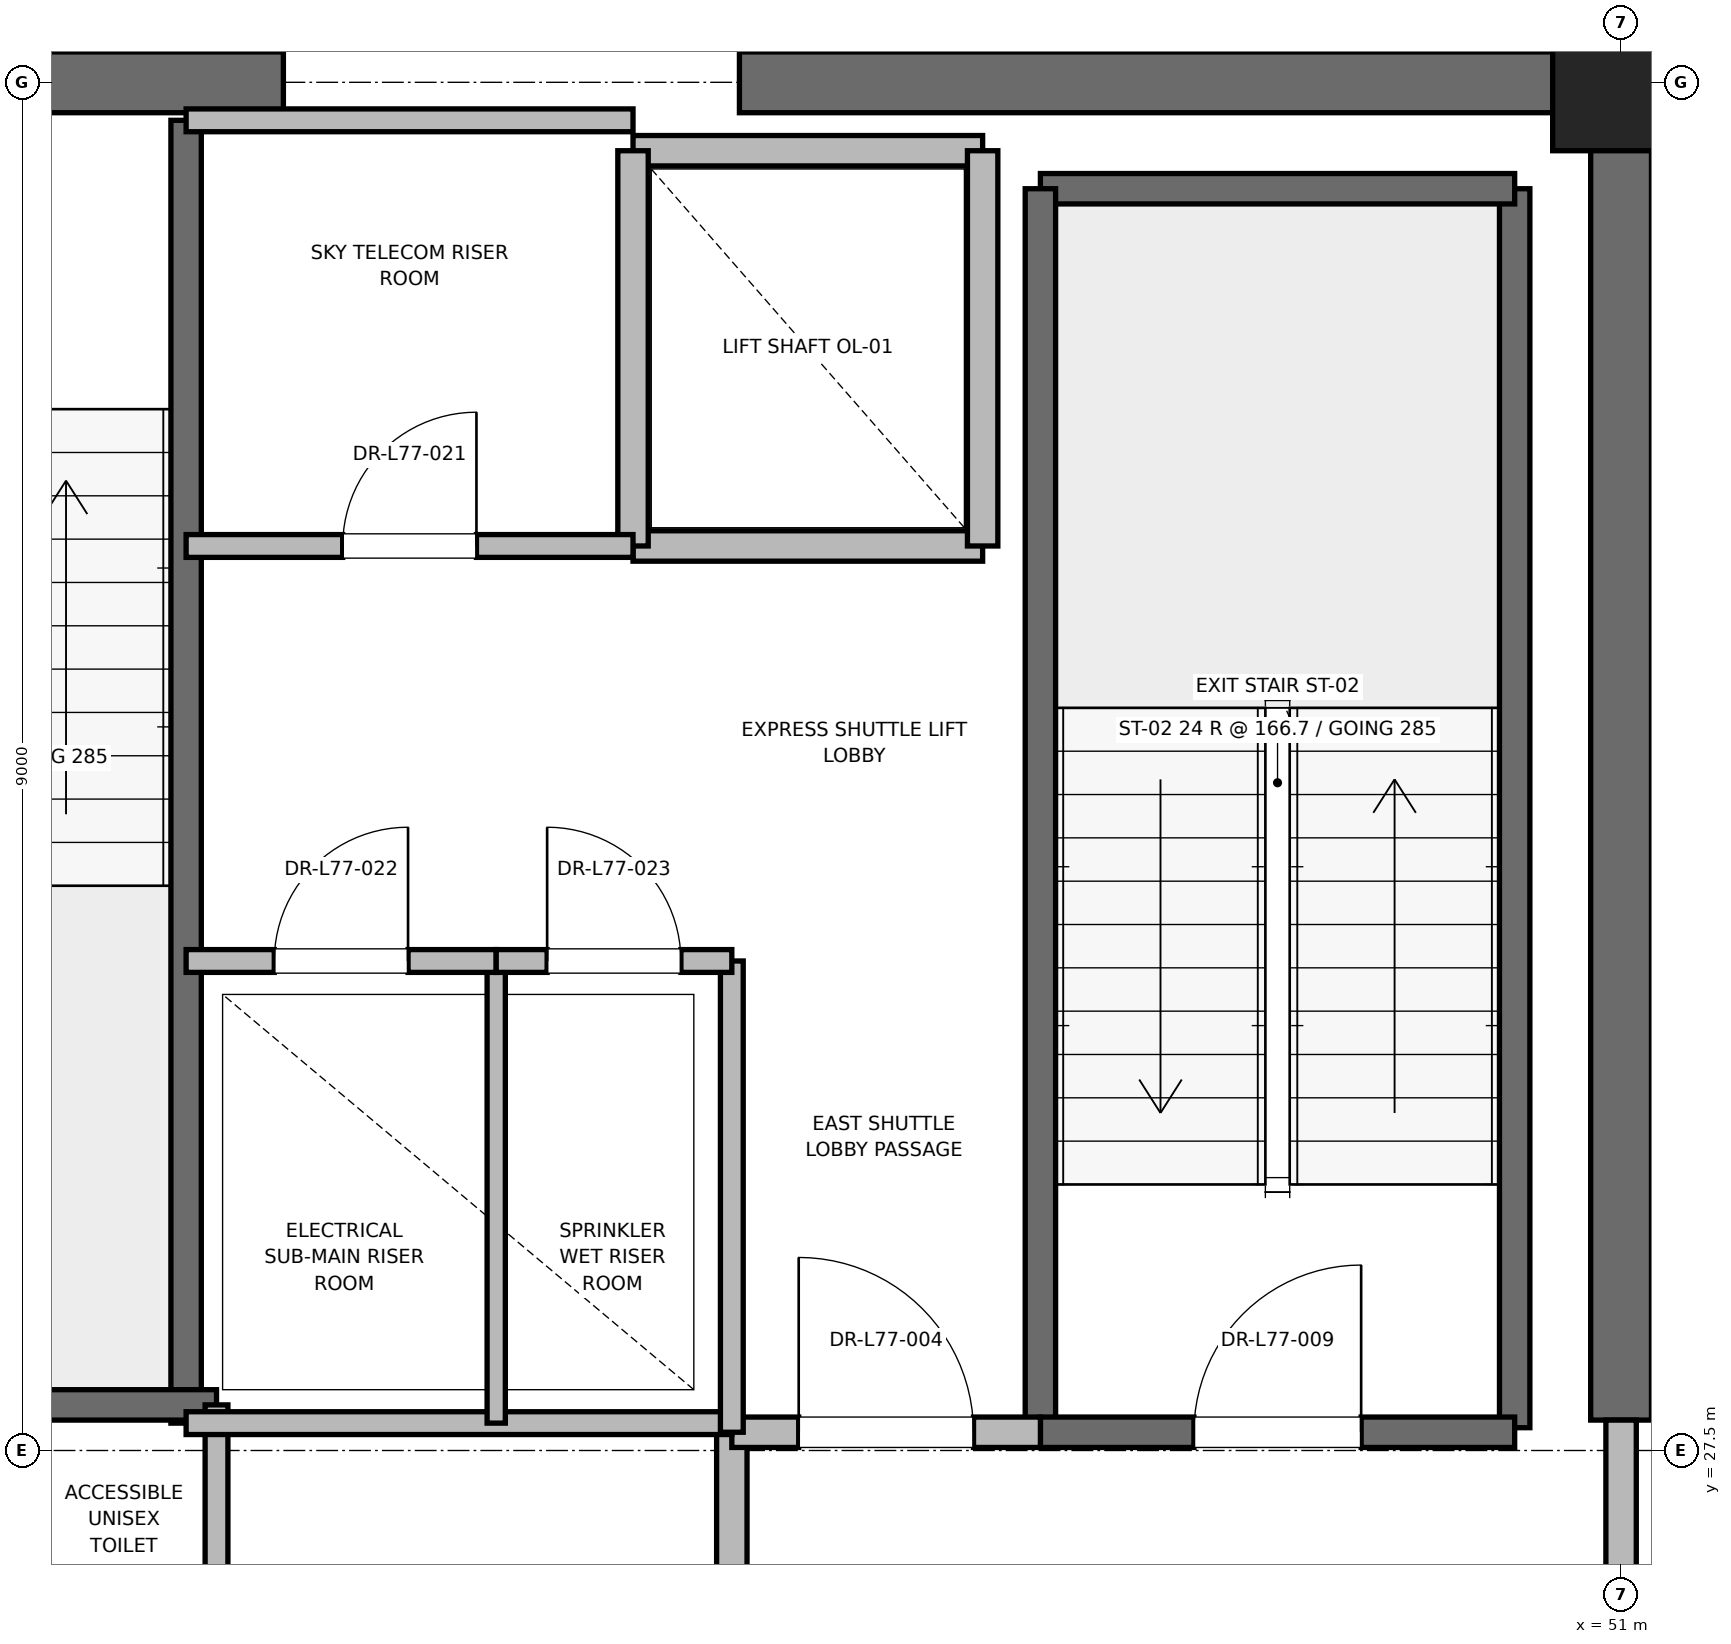
"""IFC4 building model, lengths in metres.
Left out: names, types, materials, properties, quantities, classifications, styles, units other than length and angle.
Written with IfcOpenShell. Run it as: python <this file> out.ifc"""

import sys

from ifc_helpers import new_model, si_unit, direction, frame, frame_2d, origin, origin_2d, place, context, subcontext, project, spatial, rectangle, extrude, element, fill, save


model = new_model("IFC4")
c1 = context("Model", 3, precision=1e-05, world=origin(), true_north=direction((0.0, 1.0)))
c2 = subcontext(c1, "Body", "Model", "MODEL_VIEW")
j1 = project(units=[si_unit("LENGTHUNIT", "METRE"), si_unit("PLANEANGLEUNIT", "RADIAN")], contexts=[c1])
p1 = place(None, origin())
s1 = spatial("IfcSite", under=j1, at=p1, CompositionType="ELEMENT")
p2 = place(p1, origin())
s2 = spatial("IfcBuilding", under=s1, at=p2, CompositionType="ELEMENT")
p3 = place(p2, frame((0.0, 0.0, 330.8)))
s3 = spatial("IfcBuildingStorey", under=s2, at=p3, CompositionType="ELEMENT", Elevation=330.8)
p4 = place(p3, frame((51.0, 36.5, 0.0), z_axis=(0.0, 0.0, 1.0), x_axis=(1.0, 0.0, 0.0)))
e1 = element("IfcColumn", 1, at=p4, inside=s3, PredefinedType="PILASTER", context=c2, shape_type="SweptSolid", body=[
    extrude(rectangle(XDim=0.9, YDim=0.9, at=origin_2d()), origin(), (0.0, 0.0, 1.0), 4.0),
])
p5 = place(p3, frame((37.8, 36.5, 0.0), z_axis=(0.0, 0.0, 1.0), x_axis=(1.0, 0.0, 0.0)))
e2 = element("IfcWall", 2, at=p5, inside=s3, PredefinedType="SHEAR", context=c2, shape_type="SweptSolid", body=[
    extrude(rectangle(XDim=4.4, YDim=0.4, at=frame_2d((2.2, 0.0))), origin(), (0.0, 0.0, 1.0), 3.785),
])
p6 = place(p5, frame((1.65, 0.0, 0.0)))
e3 = element("IfcOpeningElement", 3, at=p6, cuts=e2, PredefinedType="OPENING", context=c2, shape_type="SweptSolid", body=[
    extrude(rectangle(XDim=1.1, YDim=2.15, at=frame_2d((0.55, 1.075))), frame((0.0, 0.2, 0.0), z_axis=(0.0, -1.0, 0.0), x_axis=(1.0, 0.0, 0.0)), (0.0, 0.0, 1.0), 0.4),
])
p7 = place(p3, frame((45.2, 36.5, 0.0), z_axis=(0.0, 0.0, 1.0), x_axis=(1.0, 0.0, 0.0)))
e4 = element("IfcWall", 4, at=p7, inside=s3, PredefinedType="SHEAR", context=c2, shape_type="SweptSolid", body=[
    extrude(rectangle(XDim=5.8, YDim=0.4, at=frame_2d((2.9, 0.0))), origin(), (0.0, 0.0, 1.0), 3.785),
])
p8 = place(p3, frame((51.0, 27.7, 0.0), z_axis=(0.0, 0.0, 1.0), x_axis=(0.0, 1.0, 0.0)))
e5 = element("IfcWall", 5, at=p8, inside=s3, PredefinedType="SHEAR", context=c2, shape_type="SweptSolid", body=[
    extrude(rectangle(XDim=8.8, YDim=0.4, at=frame_2d((4.4, 0.0))), origin(), (0.0, 0.0, 1.0), 3.785),
])
p9 = place(p3, frame((50.3, 27.65, 0.0), z_axis=(0.0, 0.0, 1.0), x_axis=(0.0, 1.0, 0.0)))
e6 = element("IfcWall", 6, at=p9, inside=s3, PredefinedType="SOLIDWALL", context=c2, shape_type="SweptSolid", body=[
    extrude(rectangle(XDim=8.15, YDim=0.2, at=frame_2d((4.075, 0.0))), origin(), (0.0, 0.0, 1.0), 3.785),
])
p10 = place(p3, frame((47.18, 35.8, 0.0), z_axis=(0.0, 0.0, 1.0), x_axis=(1.0, 0.0, 0.0)))
e7 = element("IfcWall", 7, at=p10, inside=s3, PredefinedType="SOLIDWALL", context=c2, shape_type="SweptSolid", body=[
    extrude(rectangle(XDim=3.12, YDim=0.2, at=frame_2d((1.56, 0.0))), origin(), (0.0, 0.0, 1.0), 3.785),
])
p11 = place(p3, frame((47.18, 27.62, 0.0), z_axis=(0.0, 0.0, 1.0), x_axis=(0.0, 1.0, 0.0)))
e8 = element("IfcWall", 8, at=p11, inside=s3, PredefinedType="SOLIDWALL", context=c2, shape_type="SweptSolid", body=[
    extrude(rectangle(XDim=8.18, YDim=0.2, at=frame_2d((4.09, 0.0))), origin(), (0.0, 0.0, 1.0), 3.785),
])
p12 = place(p3, frame((47.18, 27.62, 0.0), z_axis=(0.0, 0.0, 1.0), x_axis=(1.0, 0.0, 0.0)))
e9 = element("IfcWall", 9, at=p12, inside=s3, PredefinedType="SOLIDWALL", context=c2, shape_type="SweptSolid", body=[
    extrude(rectangle(XDim=3.12, YDim=0.2, at=frame_2d((1.56, 0.0))), origin(), (0.0, 0.0, 1.0), 3.785),
])
p13 = place(p12, frame((1.01, 0.0, 0.0)))
e10 = element("IfcOpeningElement", 10, at=p13, cuts=e9, PredefinedType="OPENING", context=c2, shape_type="SweptSolid", body=[
    extrude(rectangle(XDim=1.1, YDim=2.15, at=frame_2d((0.55, 1.075))), frame((0.0, 0.1, 0.0), z_axis=(0.0, -1.0, 0.0), x_axis=(1.0, 0.0, 0.0)), (0.0, 0.0, 1.0), 0.2),
])
p14 = place(p3, frame((41.56, 27.68, 0.0), z_axis=(0.0, 0.0, 1.0), x_axis=(0.0, 1.0, 0.0)))
e11 = element("IfcWall", 11, at=p14, inside=s3, PredefinedType="SOLIDWALL", context=c2, shape_type="SweptSolid", body=[
    extrude(rectangle(XDim=8.57, YDim=0.2, at=frame_2d((4.285, 0.0))), origin(), (0.0, 0.0, 1.0), 3.785),
])
p15 = place(p3, frame((38.44, 27.8, 0.0), z_axis=(0.0, 0.0, 1.0), x_axis=(1.0, 0.0, 0.0)))
e12 = element("IfcWall", 12, at=p15, inside=s3, PredefinedType="SOLIDWALL", context=c2, shape_type="SweptSolid", body=[
    extrude(rectangle(XDim=3.32, YDim=0.2, at=frame_2d((1.66, 0.0))), origin(), (0.0, 0.0, 1.0), 3.785),
])
p16 = place(p3, frame((45.15, 24.25, 0.0), z_axis=(0.0, 0.0, 1.0), x_axis=(0.0, 1.0, 0.0)))
e13 = element("IfcWall", 13, at=p16, inside=s3, PredefinedType="PARTITIONING", context=c2, shape_type="SweptSolid", body=[
    extrude(rectangle(XDim=3.37, YDim=0.2, at=frame_2d((1.685, 0.0))), origin(), (0.0, 0.0, 1.0), 3.785),
])
p17 = place(p3, frame((45.15, 27.62, 0.0), z_axis=(0.0, 0.0, 1.0), x_axis=(1.0, 0.0, 0.0)))
e14 = element("IfcWall", 14, at=p17, inside=s3, PredefinedType="PARTITIONING", context=c2, shape_type="SweptSolid", body=[
    extrude(rectangle(XDim=2.03, YDim=0.2, at=frame_2d((1.015, 0.0))), origin(), (0.0, 0.0, 1.0), 3.785),
])
p18 = place(p17, frame((0.44, 0.0, 0.0)))
e15 = element("IfcOpeningElement", 15, at=p18, cuts=e14, PredefinedType="OPENING", context=c2, shape_type="SweptSolid", body=[
    extrude(rectangle(XDim=1.15, YDim=2.2, at=frame_2d((0.575, 1.1))), frame((0.0, 0.1, 0.0), z_axis=(0.0, -1.0, 0.0), x_axis=(1.0, 0.0, 0.0)), (0.0, 0.0, 1.0), 0.2),
])
p19 = place(p3, frame((51.0, 24.3, 0.0), z_axis=(0.0, 0.0, 1.0), x_axis=(0.0, 1.0, 0.0)))
e16 = element("IfcWall", 16, at=p19, inside=s3, PredefinedType="PARTITIONING", context=c2, shape_type="SweptSolid", body=[
    extrude(rectangle(XDim=3.4, YDim=0.2, at=frame_2d((1.7, 0.0))), origin(), (0.0, 0.0, 1.0), 2.865),
])
p20 = place(p19, frame((1.125, 0.0, 0.0)))
e17 = element("IfcOpeningElement", 17, at=p20, cuts=e16, PredefinedType="OPENING", context=c2, shape_type="SweptSolid", body=[
    extrude(rectangle(XDim=1.15, YDim=2.2, at=frame_2d((0.575, 1.1))), frame((0.0, 0.1, 0.0), z_axis=(0.0, -1.0, 0.0), x_axis=(1.0, 0.0, 0.0)), (0.0, 0.0, 1.0), 0.2),
])
p21 = place(p3, frame((44.5, 33.45, 0.0), z_axis=(0.0, 0.0, 1.0), x_axis=(1.0, 0.0, 0.0)))
e18 = element("IfcWall", 18, at=p21, inside=s3, PredefinedType="SOLIDWALL", context=c2, shape_type="SweptSolid", body=[
    extrude(rectangle(XDim=2.3, YDim=0.2, at=frame_2d((1.15, 0.0))), origin(), (0.0, 0.0, 1.0), 3.785),
])
p22 = place(p3, frame((46.8, 36.05, 0.0), z_axis=(0.0, 0.0, 1.0), x_axis=(-1.0, 0.0, 0.0)))
e19 = element("IfcWall", 19, at=p22, inside=s3, PredefinedType="SOLIDWALL", context=c2, shape_type="SweptSolid", body=[
    extrude(rectangle(XDim=2.3, YDim=0.2, at=frame_2d((1.15, 0.0))), origin(), (0.0, 0.0, 1.0), 2.865),
])
p23 = place(p3, frame((44.5, 36.05, 0.0), z_axis=(0.0, 0.0, 1.0), x_axis=(0.0, -1.0, 0.0)))
e20 = element("IfcWall", 20, at=p23, inside=s3, PredefinedType="SOLIDWALL", context=c2, shape_type="SweptSolid", body=[
    extrude(rectangle(XDim=2.6, YDim=0.2, at=frame_2d((1.3, 0.0))), origin(), (0.0, 0.0, 1.0), 2.865),
])
p24 = place(p3, frame((46.8, 33.45, 0.0), z_axis=(0.0, 0.0, 1.0), x_axis=(0.0, 1.0, 0.0)))
e21 = element("IfcWall", 21, at=p24, inside=s3, PredefinedType="SOLIDWALL", context=c2, shape_type="SweptSolid", body=[
    extrude(rectangle(XDim=2.6, YDim=0.2, at=frame_2d((1.3, 0.0))), origin(), (0.0, 0.0, 1.0), 3.785),
])
p25 = place(p3, frame((41.76, 23.8, 0.0), z_axis=(0.0, 0.0, 1.0), x_axis=(0.0, 1.0, 0.0)))
e22 = element("IfcWall", 22, at=p25, inside=s3, PredefinedType="PARTITIONING", context=c2, shape_type="SweptSolid", body=[
    extrude(rectangle(XDim=4.0, YDim=0.15, at=frame_2d((2.0, 0.0))), origin(), (0.0, 0.0, 1.0), 2.85),
])
p26 = place(p3, frame((41.56, 27.68, 0.0), z_axis=(0.0, 0.0, 1.0), x_axis=(1.0, 0.0, 0.0)))
e23 = element("IfcWall", 23, at=p26, inside=s3, PredefinedType="PARTITIONING", context=c2, shape_type="SweptSolid", body=[
    extrude(rectangle(XDim=3.59, YDim=0.15, at=frame_2d((1.795, 0.0))), origin(), (0.0, 0.0, 1.0), 2.85),
])
p27 = place(p3, frame((45.15, 27.62, 0.0), z_axis=(0.0, 0.0, 1.0), x_axis=(0.0, 1.0, 0.0)))
e24 = element("IfcWall", 24, at=p27, inside=s3, PredefinedType="PARTITIONING", context=c2, shape_type="SweptSolid", body=[
    extrude(rectangle(XDim=3.1, YDim=0.15, at=frame_2d((1.55, 0.0))), origin(), (0.0, 0.0, 1.0), 2.85),
])
p28 = place(p3, frame((43.6, 27.68, 0.0), z_axis=(0.0, 0.0, 1.0), x_axis=(0.0, 1.0, 0.0)))
e25 = element("IfcWall", 25, at=p28, inside=s3, PredefinedType="PARTITIONING", context=c2, shape_type="SweptSolid", body=[
    extrude(rectangle(XDim=3.04, YDim=0.12, at=frame_2d((1.52, 0.0))), origin(), (0.0, 0.0, 1.0), 2.85),
])
p29 = place(p3, frame((41.56, 30.72, 0.0), z_axis=(0.0, 0.0, 1.0), x_axis=(1.0, 0.0, 0.0)))
e26 = element("IfcWall", 26, at=p29, inside=s3, PredefinedType="PARTITIONING", context=c2, shape_type="SweptSolid", body=[
    extrude(rectangle(XDim=2.04, YDim=0.15, at=frame_2d((1.02, 0.0))), origin(), (0.0, 0.0, 1.0), 2.85),
])
p30 = place(p29, frame((0.58, 0.0, 0.0)))
e27 = element("IfcOpeningElement", 27, at=p30, cuts=e26, PredefinedType="OPENING", context=c2, shape_type="SweptSolid", body=[
    extrude(rectangle(XDim=0.88, YDim=2.1, at=frame_2d((0.44, 1.05))), frame((0.0, 0.075, 0.0), z_axis=(0.0, -1.0, 0.0), x_axis=(1.0, 0.0, 0.0)), (0.0, 0.0, 1.0), 0.15),
])
p31 = place(p3, frame((43.6, 30.72, 0.0), z_axis=(0.0, 0.0, 1.0), x_axis=(1.0, 0.0, 0.0)))
e28 = element("IfcWall", 28, at=p31, inside=s3, PredefinedType="PARTITIONING", context=c2, shape_type="SweptSolid", body=[
    extrude(rectangle(XDim=1.55, YDim=0.15, at=frame_2d((0.775, 0.0))), origin(), (0.0, 0.0, 1.0), 2.85),
])
p32 = place(p31, frame((0.335, 0.0, 0.0)))
e29 = element("IfcOpeningElement", 29, at=p32, cuts=e28, PredefinedType="OPENING", context=c2, shape_type="SweptSolid", body=[
    extrude(rectangle(XDim=0.88, YDim=2.1, at=frame_2d((0.44, 1.05))), frame((0.0, 0.075, 0.0), z_axis=(0.0, -1.0, 0.0), x_axis=(1.0, 0.0, 0.0)), (0.0, 0.0, 1.0), 0.15),
])
p33 = place(p3, frame((41.56, 36.25, 0.0), z_axis=(0.0, 0.0, 1.0), x_axis=(1.0, 0.0, 0.0)))
e30 = element("IfcWall", 30, at=p33, inside=s3, PredefinedType="PARTITIONING", context=c2, shape_type="SweptSolid", body=[
    extrude(rectangle(XDim=2.94, YDim=0.15, at=frame_2d((1.47, 0.0))), origin(), (0.0, 0.0, 1.0), 2.85),
])
p34 = place(p3, frame((41.56, 33.45, 0.0), z_axis=(0.0, 0.0, 1.0), x_axis=(1.0, 0.0, 0.0)))
e31 = element("IfcWall", 31, at=p34, inside=s3, PredefinedType="PARTITIONING", context=c2, shape_type="SweptSolid", body=[
    extrude(rectangle(XDim=2.94, YDim=0.15, at=frame_2d((1.47, 0.0))), origin(), (0.0, 0.0, 1.0), 2.85),
])
p35 = place(p34, frame((1.03, 0.0, 0.0)))
e32 = element("IfcOpeningElement", 32, at=p35, cuts=e31, PredefinedType="OPENING", context=c2, shape_type="SweptSolid", body=[
    extrude(rectangle(XDim=0.88, YDim=2.1, at=frame_2d((0.44, 1.05))), frame((0.0, 0.075, 0.0), z_axis=(0.0, -1.0, 0.0), x_axis=(1.0, 0.0, 0.0)), (0.0, 0.0, 1.0), 0.15),
])
p36 = place(p13, origin())
e33 = element("IfcDoor", 33, at=p36, inside=s3, OperationType="SINGLE_SWING_RIGHT", PredefinedType="DOOR", context=c2, shape_type="SweptSolid", body=[
    extrude(rectangle(XDim=1.1, YDim=2.15, at=frame_2d((0.55, 1.075))), frame((0.0, 0.025, 0.0), z_axis=(0.0, -1.0, 0.0), x_axis=(1.0, 0.0, 0.0)), (0.0, 0.0, 1.0), 0.05),
])
fill(e10, e33)
p37 = place(p18, origin())
e34 = element("IfcDoor", 34, at=p37, inside=s3, OperationType="SINGLE_SWING_LEFT", PredefinedType="DOOR", context=c2, shape_type="SweptSolid", body=[
    extrude(rectangle(XDim=1.15, YDim=2.2, at=frame_2d((0.575, 1.1))), frame((0.0, 0.025, 0.0), z_axis=(0.0, -1.0, 0.0), x_axis=(1.0, 0.0, 0.0)), (0.0, 0.0, 1.0), 0.05),
])
fill(e15, e34)
p38 = place(p30, origin())
e35 = element("IfcDoor", 35, at=p38, inside=s3, OperationType="SINGLE_SWING_RIGHT", PredefinedType="DOOR", context=c2, shape_type="SweptSolid", body=[
    extrude(rectangle(XDim=0.88, YDim=2.1, at=frame_2d((0.44, 1.05))), frame((0.0, 0.025, 0.0), z_axis=(0.0, -1.0, 0.0), x_axis=(1.0, 0.0, 0.0)), (0.0, 0.0, 1.0), 0.05),
])
fill(e27, e35)
p39 = place(p32, origin())
e36 = element("IfcDoor", 36, at=p39, inside=s3, OperationType="SINGLE_SWING_LEFT", PredefinedType="DOOR", context=c2, shape_type="SweptSolid", body=[
    extrude(rectangle(XDim=0.88, YDim=2.1, at=frame_2d((0.44, 1.05))), frame((0.0, 0.025, 0.0), z_axis=(0.0, -1.0, 0.0), x_axis=(1.0, 0.0, 0.0)), (0.0, 0.0, 1.0), 0.05),
])
fill(e29, e36)
p40 = place(p35, origin())
e37 = element("IfcDoor", 37, at=p40, inside=s3, OperationType="SINGLE_SWING_RIGHT", PredefinedType="DOOR", context=c2, shape_type="SweptSolid", body=[
    extrude(rectangle(XDim=0.88, YDim=2.1, at=frame_2d((0.44, 1.05))), frame((0.0, 0.025, 0.0), z_axis=(0.0, -1.0, 0.0), x_axis=(1.0, 0.0, 0.0)), (0.0, 0.0, 1.0), 0.05),
])
fill(e32, e37)
save(model, sys.argv[1])
